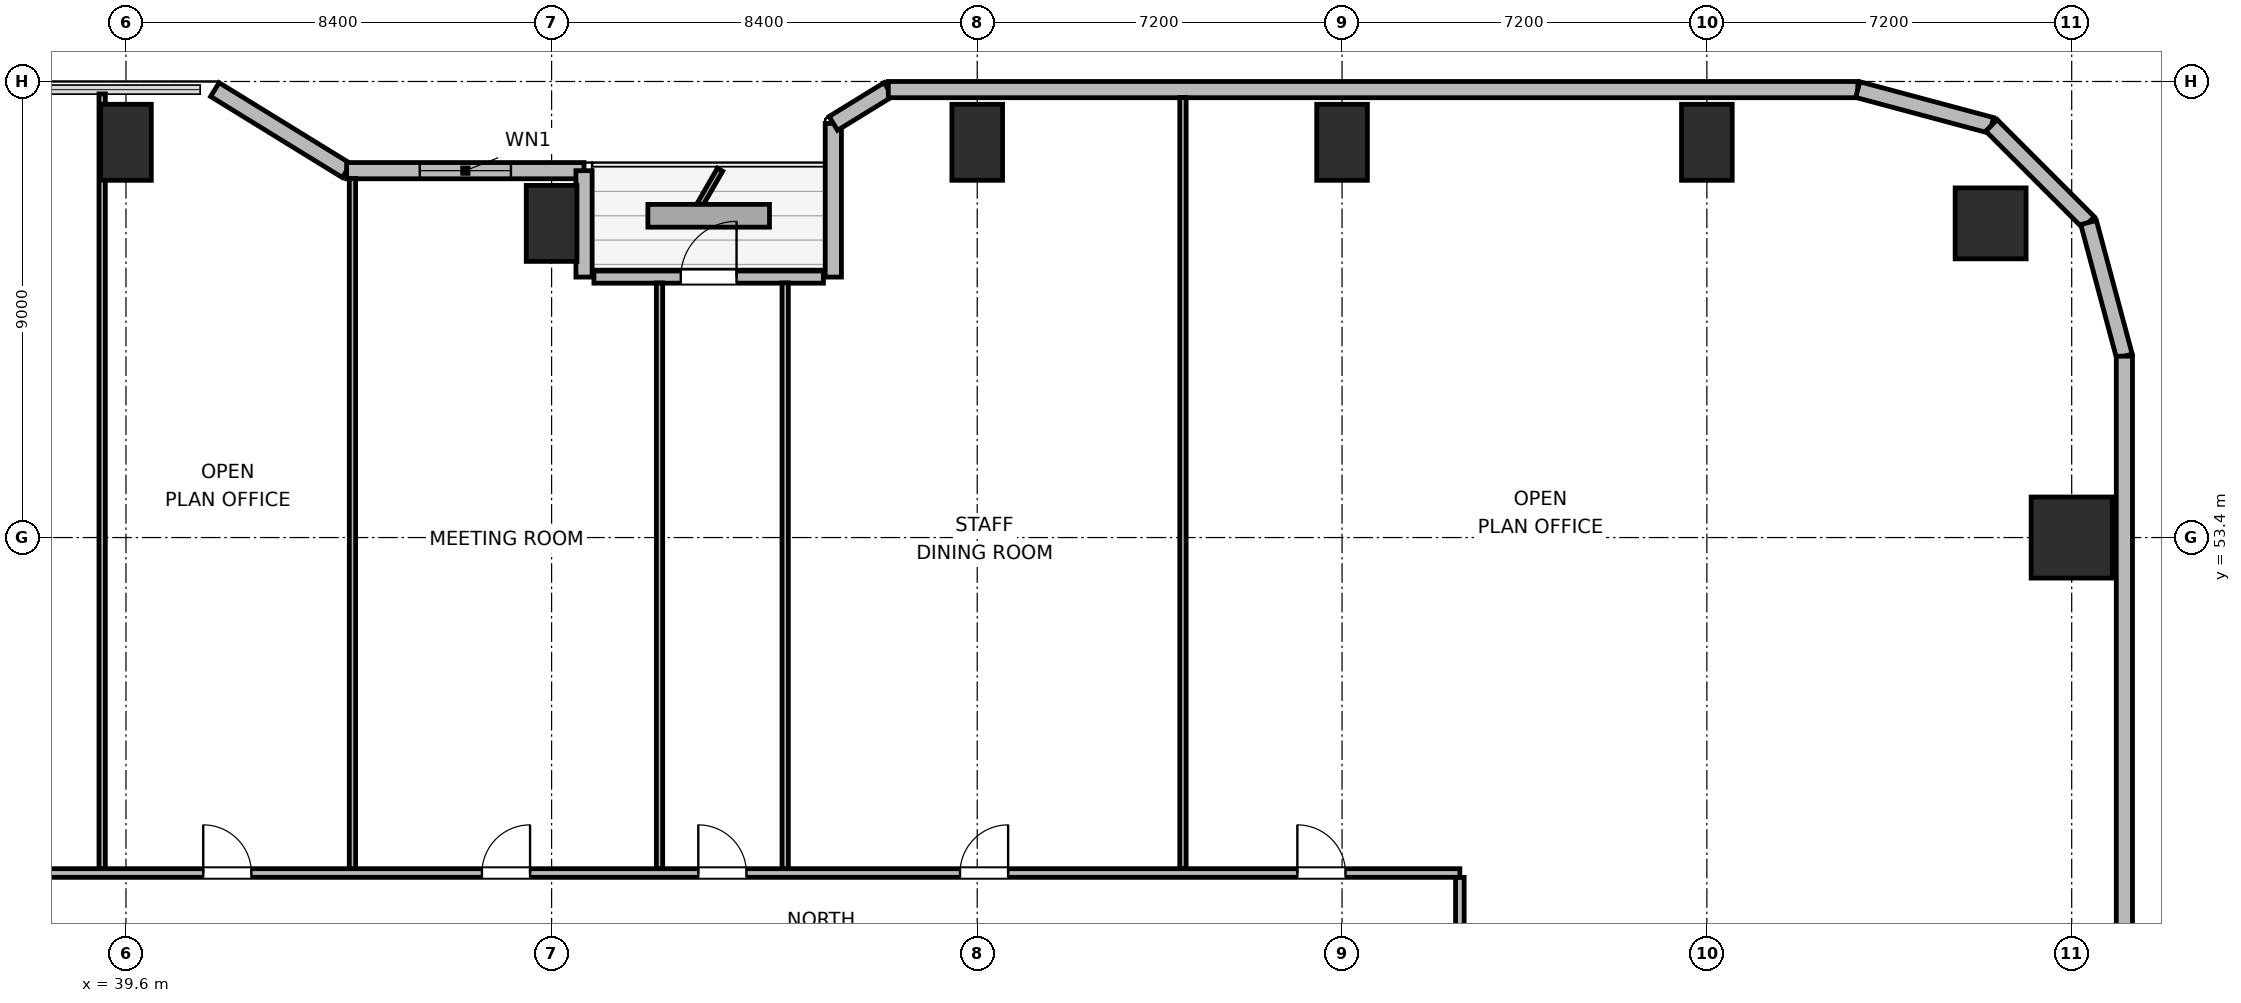
"""IFC4 building model, lengths in metres.
Left out: names, types, materials, properties, quantities, classifications, styles, units other than length and angle.
Written with IfcOpenShell. Run it as: python <this file> out.ifc"""

import sys

from ifc_helpers import new_model, si_unit, direction, frame, frame_2d, origin, origin_2d, place, context, subcontext, project, spatial, rectangle, circle, extrude, element, fill, save


model = new_model("IFC4")
c1 = context("Model", 3, precision=1e-05, world=origin(), true_north=direction((0.0, 1.0)))
c2 = subcontext(c1, "Body", "Model", "MODEL_VIEW")
j1 = project(units=[si_unit("LENGTHUNIT", "METRE"), si_unit("PLANEANGLEUNIT", "RADIAN")], contexts=[c1])
p1 = place(None, origin())
s1 = spatial("IfcSite", under=j1, at=p1, CompositionType="ELEMENT")
p2 = place(p1, origin())
s2 = spatial("IfcBuilding", under=s1, at=p2, CompositionType="ELEMENT")
p3 = place(p2, frame((0.0, 0.0, 37.2)))
s3 = spatial("IfcBuildingStorey", under=s2, at=p3, CompositionType="ELEMENT", Elevation=37.2)
p4 = place(p3, frame((76.4, 59.6, 0.0), z_axis=(0.0, 0.0, 1.0), x_axis=(1.0, 0.0, 0.0)))
e1 = element("IfcColumn", 1, at=p4, inside=s3, PredefinedType="COLUMN", context=c2, shape_type="SweptSolid", body=[
    extrude(circle(Radius=0.7, at=origin_2d()), origin(), (0.0, 0.0, 1.0), 3.9),
])
for number, where, z_axis, x_axis in (
    (2, (39.6, 61.2, 0.0), (0.0, 0.0, 1.0), (1.0, 0.0, 0.0)),
    (3, (48.0, 59.6, 0.0), (0.0, 0.0, 1.0), (1.0, 0.0, 0.0)),
    (4, (56.4, 61.2, 0.0), (0.0, 0.0, 1.0), (1.0, 0.0, 0.0)),
    (5, (63.6, 61.2, 0.0), (0.0, 0.0, 1.0), (1.0, 0.0, 0.0)),
    (6, (70.8, 61.2, 0.0), (0.0, 0.0, 1.0), (1.0, 0.0, 0.0)),
):
    element("IfcColumn", number, at=place(p3, frame(where, z_axis=z_axis, x_axis=x_axis)), inside=s3, PredefinedType="COLUMN", context=c2, shape_type="SweptSolid", body=[
        extrude(rectangle(XDim=1.0, YDim=1.5, at=origin_2d()), origin(), (0.0, 0.0, 1.0), 3.9),
    ])
p5 = place(p3, frame((78.0, 53.4, 0.0), z_axis=(0.0, 0.0, 1.0), x_axis=(1.0, 0.0, 0.0)))
e7 = element("IfcColumn", 7, at=p5, inside=s3, PredefinedType="COLUMN", context=c2, shape_type="SweptSolid", body=[
    extrude(rectangle(XDim=1.6, YDim=1.6, at=origin_2d()), origin(), (0.0, 0.0, 1.0), 3.9),
])
p6 = place(p3, frame((41.355, 62.24, 0.0), z_axis=(0.0, 0.0, 1.0), x_axis=(0.851630857047, -0.524142044989, 0.0)))
e8 = element("IfcWall", 8, at=p6, inside=s3, PredefinedType="SOLIDWALL", context=c2, shape_type="SweptSolid", body=[
    extrude(rectangle(XDim=3.053, YDim=0.32, at=frame_2d((1.526, 0.0))), origin(), (0.0, 0.0, 1.0), 2.875),
])
p7 = place(p3, frame((43.955, 60.64, 0.0), z_axis=(0.0, 0.0, 1.0), x_axis=(1.0, 0.0, 0.0)))
e9 = element("IfcWall", 9, at=p7, inside=s3, PredefinedType="SOLIDWALL", context=c2, shape_type="SweptSolid", body=[
    extrude(rectangle(XDim=4.685, YDim=0.32, at=frame_2d((2.343, 0.0))), origin(), (0.0, 0.0, 1.0), 2.875),
])
p8 = place(p7, frame((1.443, 0.0, 0.85)))
e10 = element("IfcOpeningElement", 10, at=p8, cuts=e9, PredefinedType="OPENING", context=c2, shape_type="SweptSolid", body=[
    extrude(rectangle(XDim=1.8, YDim=1.1, at=frame_2d((0.9, 0.55))), frame((0.0, 0.17, 0.0), z_axis=(0.0, -1.0, 0.0), x_axis=(1.0, 0.0, 0.0)), (0.0, 0.0, 1.0), 0.34),
])
p9 = place(p3, frame((48.64, 60.64, 0.0), z_axis=(0.0, 0.0, 1.0), x_axis=(0.0, -1.0, 0.0)))
e11 = element("IfcWall", 11, at=p9, inside=s3, PredefinedType="SOLIDWALL", context=c2, shape_type="SweptSolid", body=[
    extrude(rectangle(XDim=2.1, YDim=0.32, at=frame_2d((1.05, 0.0))), origin(), (0.0, 0.0, 1.0), 2.875),
])
p10 = place(p3, frame((48.835, 58.54, 0.0), z_axis=(0.0, 0.0, 1.0), x_axis=(1.0, 0.0, 0.0)))
e12 = element("IfcWall", 12, at=p10, inside=s3, PredefinedType="SOLIDWALL", context=c2, shape_type="SweptSolid", body=[
    extrude(rectangle(XDim=4.53, YDim=0.24, at=frame_2d((2.265, 0.0))), origin(), (0.0, 0.0, 1.0), 3.64),
])
p11 = place(p10, frame((1.715, 0.0, 0.0)))
e13 = element("IfcOpeningElement", 13, at=p11, cuts=e12, PredefinedType="OPENING", context=c2, shape_type="SweptSolid", body=[
    extrude(rectangle(XDim=1.1, YDim=2.04, at=frame_2d((0.55, 1.02))), frame((0.0, 0.13, 0.0), z_axis=(0.0, -1.0, 0.0), x_axis=(1.0, 0.0, 0.0)), (0.0, 0.0, 1.0), 0.26),
])
p12 = place(p3, frame((53.56, 58.54, 0.0), z_axis=(0.0, 0.0, 1.0), x_axis=(0.0, 1.0, 0.0)))
e14 = element("IfcWall", 14, at=p12, inside=s3, PredefinedType="SOLIDWALL", context=c2, shape_type="SweptSolid", body=[
    extrude(rectangle(XDim=3.032, YDim=0.32, at=frame_2d((1.516, 0.0))), origin(), (0.0, 0.0, 1.0), 2.875),
])
p13 = place(p3, frame((53.56, 61.573, 0.0), z_axis=(0.0, 0.0, 1.0), x_axis=(0.851776724646, 0.523904964045, 0.0)))
e15 = element("IfcWall", 15, at=p13, inside=s3, PredefinedType="SOLIDWALL", context=c2, shape_type="SweptSolid", body=[
    extrude(rectangle(XDim=1.274, YDim=0.32, at=frame_2d((0.637, 0.0))), origin(), (0.0, 0.0, 1.0), 3.64),
])
p14 = place(p3, frame((54.645, 62.24, 0.0), z_axis=(0.0, 0.0, 1.0), x_axis=(1.0, 0.0, 0.0)))
e16 = element("IfcWall", 16, at=p14, inside=s3, PredefinedType="SOLIDWALL", context=c2, shape_type="SweptSolid", body=[
    extrude(rectangle(XDim=19.134, YDim=0.32, at=frame_2d((9.567, 0.0))), origin(), (0.0, 0.0, 1.0), 3.64),
])
p15 = place(p3, frame((73.779, 62.24, 0.0), z_axis=(0.0, 0.0, 1.0), x_axis=(0.965964405026, -0.25867502435, 0.0)))
e17 = element("IfcWall", 17, at=p15, inside=s3, PredefinedType="SOLIDWALL", context=c2, shape_type="SweptSolid", body=[
    extrude(rectangle(XDim=2.731, YDim=0.32, at=frame_2d((1.366, 0.0))), origin(), (0.0, 0.0, 1.0), 3.64),
])
p16 = place(p3, frame((76.417, 61.533, 0.0), z_axis=(0.0, 0.0, 1.0), x_axis=(0.707106781187, -0.707106781187, 0.0)))
e18 = element("IfcWall", 18, at=p16, inside=s3, PredefinedType="SOLIDWALL", context=c2, shape_type="SweptSolid", body=[
    extrude(rectangle(XDim=2.71, YDim=0.32, at=frame_2d((1.355, 0.0))), origin(), (0.0, 0.0, 1.0), 3.64),
])
p17 = place(p3, frame((78.333, 59.617, 0.0), z_axis=(0.0, 0.0, 1.0), x_axis=(0.25869736047, -0.965958423373, 0.0)))
e19 = element("IfcWall", 19, at=p17, inside=s3, PredefinedType="SOLIDWALL", context=c2, shape_type="SweptSolid", body=[
    extrude(rectangle(XDim=2.731, YDim=0.32, at=frame_2d((1.366, 0.0))), origin(), (0.0, 0.0, 1.0), 3.64),
])
p18 = place(p3, frame((79.04, 56.979, 0.0), z_axis=(0.0, 0.0, 1.0), x_axis=(0.0, -1.0, 0.0)))
e20 = element("IfcWall", 20, at=p18, inside=s3, PredefinedType="SOLIDWALL", context=c2, shape_type="SweptSolid", body=[
    extrude(rectangle(XDim=14.219, YDim=0.32, at=frame_2d((7.109, 0.0))), origin(), (0.0, 0.0, 1.0), 3.64),
])
p19 = place(p3, frame((30.075, 46.78, 0.0), z_axis=(0.0, 0.0, 1.0), x_axis=(1.0, 0.0, 0.0)))
e21 = element("IfcWall", 21, at=p19, inside=s3, PredefinedType="PARTITIONING", context=c2, shape_type="SweptSolid", body=[
    extrude(rectangle(XDim=35.85, YDim=0.17, at=frame_2d((17.925, 0.0))), origin(), (0.0, 0.0, 1.0), 3.64),
])
p20 = place(p19, frame((4.053, 0.0, 0.0)))
e22 = element("IfcOpeningElement", 22, at=p20, cuts=e21, PredefinedType="OPENING", context=c2, shape_type="SweptSolid", body=[
    extrude(rectangle(XDim=0.95, YDim=2.04, at=frame_2d((0.475, 1.02))), frame((0.0, 0.095, 0.0), z_axis=(0.0, -1.0, 0.0), x_axis=(1.0, 0.0, 0.0)), (0.0, 0.0, 1.0), 0.19),
])
p21 = place(p19, frame((11.05, 0.0, 0.0)))
e23 = element("IfcOpeningElement", 23, at=p21, cuts=e21, PredefinedType="OPENING", context=c2, shape_type="SweptSolid", body=[
    extrude(rectangle(XDim=0.95, YDim=2.04, at=frame_2d((0.475, 1.02))), frame((0.0, 0.095, 0.0), z_axis=(0.0, -1.0, 0.0), x_axis=(1.0, 0.0, 0.0)), (0.0, 0.0, 1.0), 0.19),
])
p22 = place(p19, frame((16.55, 0.0, 0.0)))
e24 = element("IfcOpeningElement", 24, at=p22, cuts=e21, PredefinedType="OPENING", context=c2, shape_type="SweptSolid", body=[
    extrude(rectangle(XDim=0.95, YDim=2.04, at=frame_2d((0.475, 1.02))), frame((0.0, 0.095, 0.0), z_axis=(0.0, -1.0, 0.0), x_axis=(1.0, 0.0, 0.0)), (0.0, 0.0, 1.0), 0.19),
])
p23 = place(p19, frame((20.82, 0.0, 0.0)))
e25 = element("IfcOpeningElement", 25, at=p23, cuts=e21, PredefinedType="OPENING", context=c2, shape_type="SweptSolid", body=[
    extrude(rectangle(XDim=0.95, YDim=2.04, at=frame_2d((0.475, 1.02))), frame((0.0, 0.095, 0.0), z_axis=(0.0, -1.0, 0.0), x_axis=(1.0, 0.0, 0.0)), (0.0, 0.0, 1.0), 0.19),
])
p24 = place(p19, frame((25.985, 0.0, 0.0)))
e26 = element("IfcOpeningElement", 26, at=p24, cuts=e21, PredefinedType="OPENING", context=c2, shape_type="SweptSolid", body=[
    extrude(rectangle(XDim=0.95, YDim=2.04, at=frame_2d((0.475, 1.02))), frame((0.0, 0.095, 0.0), z_axis=(0.0, -1.0, 0.0), x_axis=(1.0, 0.0, 0.0)), (0.0, 0.0, 1.0), 0.19),
])
p25 = place(p19, frame((32.643, 0.0, 0.0)))
e27 = element("IfcOpeningElement", 27, at=p25, cuts=e21, PredefinedType="OPENING", context=c2, shape_type="SweptSolid", body=[
    extrude(rectangle(XDim=0.95, YDim=2.04, at=frame_2d((0.475, 1.02))), frame((0.0, 0.095, 0.0), z_axis=(0.0, -1.0, 0.0), x_axis=(1.0, 0.0, 0.0)), (0.0, 0.0, 1.0), 0.19),
])
p26 = place(p3, frame((65.925, 25.307, 0.0), z_axis=(0.0, 0.0, 1.0), x_axis=(0.0, 1.0, 0.0)))
e28 = element("IfcWall", 28, at=p26, inside=s3, PredefinedType="PARTITIONING", context=c2, shape_type="SweptSolid", body=[
    extrude(rectangle(XDim=21.386, YDim=0.17, at=frame_2d((10.693, 0.0))), origin(), (0.0, 0.0, 1.0), 3.64),
])
p27 = place(p26, frame((5.428, 0.0, 0.0)))
e29 = element("IfcOpeningElement", 29, at=p27, cuts=e28, PredefinedType="OPENING", context=c2, shape_type="SweptSolid", body=[
    extrude(rectangle(XDim=0.95, YDim=2.04, at=frame_2d((0.475, 1.02))), frame((0.0, 0.095, 0.0), z_axis=(0.0, -1.0, 0.0), x_axis=(1.0, 0.0, 0.0)), (0.0, 0.0, 1.0), 0.19),
])
p28 = place(p26, frame((16.208, 0.0, 0.0)))
e30 = element("IfcOpeningElement", 30, at=p28, cuts=e28, PredefinedType="OPENING", context=c2, shape_type="SweptSolid", body=[
    extrude(rectangle(XDim=0.95, YDim=2.04, at=frame_2d((0.475, 1.02))), frame((0.0, 0.095, 0.0), z_axis=(0.0, -1.0, 0.0), x_axis=(1.0, 0.0, 0.0)), (0.0, 0.0, 1.0), 0.19),
])
p29 = place(p3, frame((39.13, 46.867, 0.0), z_axis=(0.0, 0.0, 1.0), x_axis=(0.0, 1.0, 0.0)))
e31 = element("IfcWall", 31, at=p29, inside=s3, PredefinedType="PARTITIONING", context=c2, shape_type="SweptSolid", body=[
    extrude(rectangle(XDim=15.288, YDim=0.125, at=frame_2d((7.644, 0.0))), origin(), (0.0, 0.0, 1.0), 3.64),
])
p30 = place(p3, frame((44.07, 46.867, 0.0), z_axis=(0.0, 0.0, 1.0), x_axis=(0.0, 1.0, 0.0)))
e32 = element("IfcWall", 32, at=p30, inside=s3, PredefinedType="PARTITIONING", context=c2, shape_type="SweptSolid", body=[
    extrude(rectangle(XDim=13.618, YDim=0.125, at=frame_2d((6.809, 0.0))), origin(), (0.0, 0.0, 1.0), 3.003),
])
p31 = place(p3, frame((50.13, 46.867, 0.0), z_axis=(0.0, 0.0, 1.0), x_axis=(0.0, 1.0, 0.0)))
e33 = element("IfcWall", 33, at=p31, inside=s3, PredefinedType="PARTITIONING", context=c2, shape_type="SweptSolid", body=[
    extrude(rectangle(XDim=11.558, YDim=0.125, at=frame_2d((5.779, 0.0))), origin(), (0.0, 0.0, 1.0), 3.64),
])
p32 = place(p3, frame((52.61, 46.867, 0.0), z_axis=(0.0, 0.0, 1.0), x_axis=(0.0, 1.0, 0.0)))
e34 = element("IfcWall", 34, at=p32, inside=s3, PredefinedType="PARTITIONING", context=c2, shape_type="SweptSolid", body=[
    extrude(rectangle(XDim=11.558, YDim=0.125, at=frame_2d((5.779, 0.0))), origin(), (0.0, 0.0, 1.0), 3.003),
])
p33 = place(p3, frame((60.46, 46.867, 0.0), z_axis=(0.0, 0.0, 1.0), x_axis=(0.0, 1.0, 0.0)))
e35 = element("IfcWall", 35, at=p33, inside=s3, PredefinedType="PARTITIONING", context=c2, shape_type="SweptSolid", body=[
    extrude(rectangle(XDim=15.218, YDim=0.125, at=frame_2d((7.609, 0.0))), origin(), (0.0, 0.0, 1.0), 3.64),
])
p34 = place(p8, origin())
e36 = element("IfcWindow", 36, at=p34, inside=s3, PartitioningType="SINGLE_PANEL", PredefinedType="WINDOW", context=c2, shape_type="SweptSolid", body=[
    extrude(rectangle(XDim=1.8, YDim=1.1, at=frame_2d((0.9, 0.55))), frame((0.0, 0.03, 0.0), z_axis=(0.0, -1.0, 0.0), x_axis=(1.0, 0.0, 0.0)), (0.0, 0.0, 1.0), 0.06),
])
fill(e10, e36)
p35 = place(p11, origin())
e37 = element("IfcDoor", 37, at=p35, inside=s3, OperationType="SINGLE_SWING_RIGHT", PredefinedType="DOOR", context=c2, shape_type="SweptSolid", body=[
    extrude(rectangle(XDim=1.1, YDim=2.04, at=frame_2d((0.55, 1.02))), frame((0.0, 0.025, 0.0), z_axis=(0.0, -1.0, 0.0), x_axis=(1.0, 0.0, 0.0)), (0.0, 0.0, 1.0), 0.05),
])
fill(e13, e37)
p36 = place(p21, origin())
e38 = element("IfcDoor", 38, at=p36, inside=s3, OperationType="SINGLE_SWING_LEFT", PredefinedType="DOOR", context=c2, shape_type="SweptSolid", body=[
    extrude(rectangle(XDim=0.95, YDim=2.04, at=frame_2d((0.475, 1.02))), frame((0.0, 0.025, 0.0), z_axis=(0.0, -1.0, 0.0), x_axis=(1.0, 0.0, 0.0)), (0.0, 0.0, 1.0), 0.05),
])
fill(e23, e38)
p37 = place(p22, origin())
e39 = element("IfcDoor", 39, at=p37, inside=s3, OperationType="SINGLE_SWING_RIGHT", PredefinedType="DOOR", context=c2, shape_type="SweptSolid", body=[
    extrude(rectangle(XDim=0.95, YDim=2.04, at=frame_2d((0.475, 1.02))), frame((0.0, 0.025, 0.0), z_axis=(0.0, -1.0, 0.0), x_axis=(1.0, 0.0, 0.0)), (0.0, 0.0, 1.0), 0.05),
])
fill(e24, e39)
p38 = place(p23, origin())
e40 = element("IfcDoor", 40, at=p38, inside=s3, OperationType="SINGLE_SWING_LEFT", PredefinedType="DOOR", context=c2, shape_type="SweptSolid", body=[
    extrude(rectangle(XDim=0.95, YDim=2.04, at=frame_2d((0.475, 1.02))), frame((0.0, 0.025, 0.0), z_axis=(0.0, -1.0, 0.0), x_axis=(1.0, 0.0, 0.0)), (0.0, 0.0, 1.0), 0.05),
])
fill(e25, e40)
p39 = place(p24, origin())
e41 = element("IfcDoor", 41, at=p39, inside=s3, OperationType="SINGLE_SWING_RIGHT", PredefinedType="DOOR", context=c2, shape_type="SweptSolid", body=[
    extrude(rectangle(XDim=0.95, YDim=2.04, at=frame_2d((0.475, 1.02))), frame((0.0, 0.025, 0.0), z_axis=(0.0, -1.0, 0.0), x_axis=(1.0, 0.0, 0.0)), (0.0, 0.0, 1.0), 0.05),
])
fill(e26, e41)
p40 = place(p25, origin())
e42 = element("IfcDoor", 42, at=p40, inside=s3, OperationType="SINGLE_SWING_LEFT", PredefinedType="DOOR", context=c2, shape_type="SweptSolid", body=[
    extrude(rectangle(XDim=0.95, YDim=2.04, at=frame_2d((0.475, 1.02))), frame((0.0, 0.025, 0.0), z_axis=(0.0, -1.0, 0.0), x_axis=(1.0, 0.0, 0.0)), (0.0, 0.0, 1.0), 0.05),
])
fill(e27, e42)
save(model, sys.argv[1])
